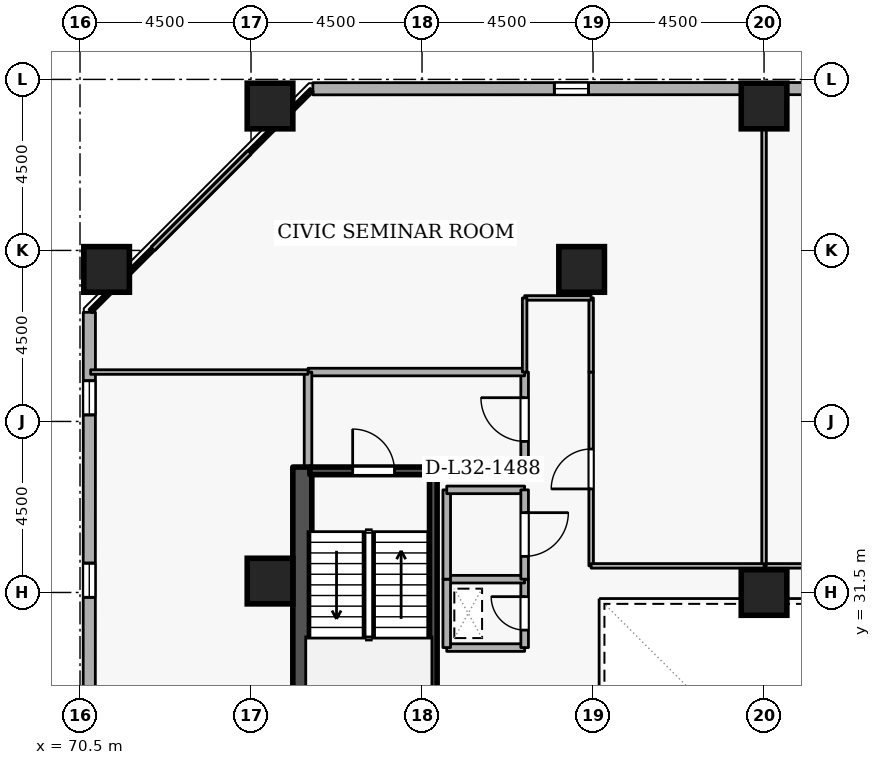
"""IFC4 building model, lengths in metres.
Left out: names, types, materials, properties, quantities, classifications, styles, units other than length and angle.
Written with IfcOpenShell. Run it as: python <this file> out.ifc"""

import sys

from ifc_helpers import new_model, si_unit, direction, frame, frame_2d, origin, origin_2d, place, context, subcontext, project, spatial, rectangle, extrude, element, fill, save


model = new_model("IFC4")
c1 = context("Model", 3, precision=1e-05, world=origin(), true_north=direction((0.0, 1.0)))
c2 = subcontext(c1, "Body", "Model", "MODEL_VIEW")
j1 = project(units=[si_unit("LENGTHUNIT", "METRE"), si_unit("PLANEANGLEUNIT", "RADIAN")], contexts=[c1])
p1 = place(None, origin())
s1 = spatial("IfcSite", under=j1, at=p1, CompositionType="ELEMENT")
p2 = place(p1, origin())
s2 = spatial("IfcBuilding", under=s1, at=p2, CompositionType="ELEMENT")
p3 = place(p2, frame((0.0, 0.0, 123.3)))
s3 = spatial("IfcBuildingStorey", under=s2, at=p3, CompositionType="ELEMENT", Elevation=123.3)
p4 = place(p3, frame((76.35, 19.2, 0.0), z_axis=(0.0, 0.0, 1.0), x_axis=(0.0, 1.0, 0.0)))
e1 = element("IfcWall", 1, at=p4, inside=s3, PredefinedType="SHEAR", context=c2, shape_type="SweptSolid", body=[
    extrude(rectangle(XDim=15.6, YDim=0.5, at=frame_2d((7.8, 0.0))), origin(), (0.0, 0.0, 1.0), 3.6),
])
for number, where, z_axis, x_axis in (
    (2, (88.5, 44.3, 0.0), (0.0, 0.0, 1.0), (1.0, 0.0, 0.0)),
    (3, (75.5, 44.3, 0.0), (0.0, 0.0, 1.0), (1.0, 0.0, 0.0)),
    (4, (71.2, 40.0, 0.0), (0.0, 0.0, 1.0), (1.0, 0.0, 0.0)),
    (5, (83.7, 40.0, 0.0), (0.0, 0.0, 1.0), (1.0, 0.0, 0.0)),
    (6, (75.5, 31.8, 0.0), (0.0, 0.0, 1.0), (1.0, 0.0, 0.0)),
    (7, (88.5, 31.5, 0.0), (0.0, 0.0, 1.0), (1.0, 0.0, 0.0)),
):
    element("IfcColumn", number, at=place(p3, frame(where, z_axis=z_axis, x_axis=x_axis)), inside=s3, PredefinedType="COLUMN", context=c2, shape_type="SweptSolid", body=[
        extrude(rectangle(XDim=1.2, YDim=1.2, at=origin_2d()), origin(), (0.0, 0.0, 1.0), 3.6),
    ])
p5 = place(p3, frame((109.681, 44.765, 0.0), z_axis=(0.0, 0.0, 1.0), x_axis=(-0.999999944762, -0.000332378036, 0.0)))
e8 = element("IfcWall", 8, at=p5, inside=s3, PredefinedType="STANDARD", context=c2, shape_type="SweptSolid", body=[
    extrude(rectangle(XDim=33.054, YDim=0.32, at=frame_2d((16.527, 0.0))), origin(), (0.0, 0.0, 1.0), 2.7),
])
p6 = place(p5, frame((1.8, 0.0, 0.72)))
e9 = element("IfcOpeningElement", 9, at=p6, cuts=e8, PredefinedType="OPENING", context=c2, shape_type="SweptSolid", body=[
    extrude(rectangle(XDim=0.9, YDim=1.75, at=frame_2d((0.45, 0.875))), frame((0.0, 0.17, 0.0), z_axis=(0.0, -1.0, 0.0), x_axis=(1.0, 0.0, 0.0)), (0.0, 0.0, 1.0), 0.34),
])
p7 = place(p5, frame((11.4, 0.0, 0.72)))
e10 = element("IfcOpeningElement", 10, at=p7, cuts=e8, PredefinedType="OPENING", context=c2, shape_type="SweptSolid", body=[
    extrude(rectangle(XDim=0.9, YDim=1.75, at=frame_2d((0.45, 0.875))), frame((0.0, 0.17, 0.0), z_axis=(0.0, -1.0, 0.0), x_axis=(1.0, 0.0, 0.0)), (0.0, 0.0, 1.0), 0.34),
])
p8 = place(p5, frame((16.2, 0.0, 0.72)))
e11 = element("IfcOpeningElement", 11, at=p8, cuts=e8, PredefinedType="OPENING", context=c2, shape_type="SweptSolid", body=[
    extrude(rectangle(XDim=0.9, YDim=1.75, at=frame_2d((0.45, 0.875))), frame((0.0, 0.17, 0.0), z_axis=(0.0, -1.0, 0.0), x_axis=(1.0, 0.0, 0.0)), (0.0, 0.0, 1.0), 0.34),
])
p9 = place(p5, frame((25.8, 0.0, 0.72)))
e12 = element("IfcOpeningElement", 12, at=p9, cuts=e8, PredefinedType="OPENING", context=c2, shape_type="SweptSolid", body=[
    extrude(rectangle(XDim=0.9, YDim=1.75, at=frame_2d((0.45, 0.875))), frame((0.0, 0.17, 0.0), z_axis=(0.0, -1.0, 0.0), x_axis=(1.0, 0.0, 0.0)), (0.0, 0.0, 1.0), 0.34),
])
p10 = place(p3, frame((70.746, 38.872, 0.0), z_axis=(0.0, 0.0, 1.0), x_axis=(-0.000332378036, -0.999999944762, 0.0)))
e13 = element("IfcWall", 13, at=p10, inside=s3, PredefinedType="STANDARD", context=c2, shape_type="SweptSolid", body=[
    extrude(rectangle(XDim=33.054, YDim=0.32, at=frame_2d((16.527, 0.0))), origin(), (0.0, 0.0, 1.0), 2.7),
])
p11 = place(p10, frame((1.8, 0.0, 0.72)))
e14 = element("IfcOpeningElement", 14, at=p11, cuts=e13, PredefinedType="OPENING", context=c2, shape_type="SweptSolid", body=[
    extrude(rectangle(XDim=0.9, YDim=1.75, at=frame_2d((0.45, 0.875))), frame((0.0, 0.17, 0.0), z_axis=(0.0, -1.0, 0.0), x_axis=(1.0, 0.0, 0.0)), (0.0, 0.0, 1.0), 0.34),
])
p12 = place(p10, frame((6.6, 0.0, 0.72)))
e15 = element("IfcOpeningElement", 15, at=p12, cuts=e13, PredefinedType="OPENING", context=c2, shape_type="SweptSolid", body=[
    extrude(rectangle(XDim=0.9, YDim=1.75, at=frame_2d((0.45, 0.875))), frame((0.0, 0.17, 0.0), z_axis=(0.0, -1.0, 0.0), x_axis=(1.0, 0.0, 0.0)), (0.0, 0.0, 1.0), 0.34),
])
p13 = place(p10, frame((16.2, 0.0, 0.72)))
e16 = element("IfcOpeningElement", 16, at=p13, cuts=e13, PredefinedType="OPENING", context=c2, shape_type="SweptSolid", body=[
    extrude(rectangle(XDim=0.9, YDim=1.75, at=frame_2d((0.45, 0.875))), frame((0.0, 0.17, 0.0), z_axis=(0.0, -1.0, 0.0), x_axis=(1.0, 0.0, 0.0)), (0.0, 0.0, 1.0), 0.34),
])
p14 = place(p10, frame((21.0, 0.0, 0.72)))
e17 = element("IfcOpeningElement", 17, at=p14, cuts=e13, PredefinedType="OPENING", context=c2, shape_type="SweptSolid", body=[
    extrude(rectangle(XDim=0.9, YDim=1.75, at=frame_2d((0.45, 0.875))), frame((0.0, 0.17, 0.0), z_axis=(0.0, -1.0, 0.0), x_axis=(1.0, 0.0, 0.0)), (0.0, 0.0, 1.0), 0.34),
])
p15 = place(p3, frame((76.55, 34.7, 0.0), z_axis=(0.0, 0.0, 1.0), x_axis=(1.0, 0.0, 0.0)))
e18 = element("IfcWall", 18, at=p15, inside=s3, PredefinedType="SHEAR", context=c2, shape_type="SweptSolid", body=[
    extrude(rectangle(XDim=3.35, YDim=0.2, at=frame_2d((1.675, 0.0))), origin(), (0.0, 0.0, 1.0), 3.6),
])
p16 = place(p15, frame((1.125, 0.0, 0.0)))
e19 = element("IfcOpeningElement", 19, at=p16, cuts=e18, PredefinedType="OPENING", context=c2, shape_type="SweptSolid", body=[
    extrude(rectangle(XDim=1.1, YDim=2.1, at=frame_2d((0.55, 1.05))), frame((0.0, 0.11, 0.0), z_axis=(0.0, -1.0, 0.0), x_axis=(1.0, 0.0, 0.0)), (0.0, 0.0, 1.0), 0.22),
])
p17 = place(p3, frame((79.797, 27.45, 0.0), z_axis=(0.0, 0.0, 1.0), x_axis=(0.0, 1.0, 0.0)))
e20 = element("IfcWall", 20, at=p17, inside=s3, PredefinedType="SHEAR", context=c2, shape_type="SweptSolid", body=[
    extrude(rectangle(XDim=7.1, YDim=0.2, at=frame_2d((3.55, 0.0))), origin(), (0.0, 0.0, 1.0), 3.6),
])
p18 = place(p3, frame((79.9, 34.8, 0.0), z_axis=(0.0, 0.0, 1.0), x_axis=(1.0, 0.0, 0.0)))
e21 = element("IfcWall", 21, at=p18, inside=s3, PredefinedType="STANDARD", context=c2, shape_type="SweptSolid", body=[
    extrude(rectangle(XDim=2.3, YDim=0.2, at=frame_2d((1.15, 0.0))), origin(), (0.0, 0.0, 1.0), 2.545),
])
p19 = place(p3, frame((82.2, 34.8, 0.0), z_axis=(0.0, 0.0, 1.0), x_axis=(0.0, 1.0, 0.0)))
e22 = element("IfcWall", 22, at=p19, inside=s3, PredefinedType="STANDARD", context=c2, shape_type="SweptSolid", body=[
    extrude(rectangle(XDim=2.5, YDim=0.2, at=frame_2d((1.25, 0.0))), origin(), (0.0, 0.0, 1.0), 3.34),
])
p20 = place(p19, frame((0.675, 0.0, 0.0)))
e23 = element("IfcOpeningElement", 23, at=p20, cuts=e22, PredefinedType="OPENING", context=c2, shape_type="SweptSolid", body=[
    extrude(rectangle(XDim=1.15, YDim=2.1, at=frame_2d((0.575, 1.05))), frame((0.0, 0.11, 0.0), z_axis=(0.0, -1.0, 0.0), x_axis=(1.0, 0.0, 0.0)), (0.0, 0.0, 1.0), 0.22),
])
p21 = place(p3, frame((82.2, 37.3, 0.0), z_axis=(0.0, 0.0, 1.0), x_axis=(-1.0, 0.0, 0.0)))
e24 = element("IfcWall", 24, at=p21, inside=s3, PredefinedType="STANDARD", context=c2, shape_type="SweptSolid", body=[
    extrude(rectangle(XDim=5.7, YDim=0.2, at=frame_2d((2.85, 0.0))), origin(), (0.0, 0.0, 1.0), 3.34),
])
p22 = place(p3, frame((76.5, 37.3, 0.0), z_axis=(0.0, 0.0, 1.0), x_axis=(0.0, -1.0, 0.0)))
e25 = element("IfcWall", 25, at=p22, inside=s3, PredefinedType="STANDARD", context=c2, shape_type="SweptSolid", body=[
    extrude(rectangle(XDim=2.5, YDim=0.2, at=frame_2d((1.25, 0.0))), origin(), (0.0, 0.0, 1.0), 3.34),
])
p23 = place(p3, frame((80.15, 30.05, 0.0), z_axis=(0.0, 0.0, 1.0), x_axis=(1.0, 0.0, 0.0)))
e26 = element("IfcWall", 26, at=p23, inside=s3, PredefinedType="STANDARD", context=c2, shape_type="SweptSolid", body=[
    extrude(rectangle(XDim=2.05, YDim=0.2, at=frame_2d((1.025, 0.0))), origin(), (0.0, 0.0, 1.0), 3.34),
])
p24 = place(p3, frame((82.2, 30.05, 0.0), z_axis=(0.0, 0.0, 1.0), x_axis=(0.0, 1.0, 0.0)))
e27 = element("IfcWall", 27, at=p24, inside=s3, PredefinedType="STANDARD", context=c2, shape_type="SweptSolid", body=[
    extrude(rectangle(XDim=1.8, YDim=0.2, at=frame_2d((0.9, 0.0))), origin(), (0.0, 0.0, 1.0), 3.34),
])
p25 = place(p24, frame((0.46, 0.0, 0.0)))
e28 = element("IfcOpeningElement", 28, at=p25, cuts=e27, PredefinedType="OPENING", context=c2, shape_type="SweptSolid", body=[
    extrude(rectangle(XDim=0.88, YDim=2.04, at=frame_2d((0.44, 1.02))), frame((0.0, 0.11, 0.0), z_axis=(0.0, -1.0, 0.0), x_axis=(1.0, 0.0, 0.0)), (0.0, 0.0, 1.0), 0.22),
])
p26 = place(p3, frame((82.2, 31.85, 0.0), z_axis=(0.0, 0.0, 1.0), x_axis=(-1.0, 0.0, 0.0)))
e29 = element("IfcWall", 29, at=p26, inside=s3, PredefinedType="STANDARD", context=c2, shape_type="SweptSolid", body=[
    extrude(rectangle(XDim=2.05, YDim=0.2, at=frame_2d((1.025, 0.0))), origin(), (0.0, 0.0, 1.0), 3.34),
])
p27 = place(p3, frame((80.15, 31.85, 0.0), z_axis=(0.0, 0.0, 1.0), x_axis=(0.0, -1.0, 0.0)))
e30 = element("IfcWall", 30, at=p27, inside=s3, PredefinedType="STANDARD", context=c2, shape_type="SweptSolid", body=[
    extrude(rectangle(XDim=1.8, YDim=0.2, at=frame_2d((0.9, 0.0))), origin(), (0.0, 0.0, 1.0), 3.34),
])
p28 = place(p3, frame((80.15, 31.85, 0.0), z_axis=(0.0, 0.0, 1.0), x_axis=(0.0, 1.0, 0.0)))
e31 = element("IfcWall", 31, at=p28, inside=s3, PredefinedType="STANDARD", context=c2, shape_type="SweptSolid", body=[
    extrude(rectangle(XDim=2.35, YDim=0.2, at=frame_2d((1.175, 0.0))), origin(), (0.0, 0.0, 1.0), 3.34),
])
p29 = place(p3, frame((80.15, 34.2, 0.0), z_axis=(0.0, 0.0, 1.0), x_axis=(1.0, 0.0, 0.0)))
e32 = element("IfcWall", 32, at=p29, inside=s3, PredefinedType="STANDARD", context=c2, shape_type="SweptSolid", body=[
    extrude(rectangle(XDim=2.05, YDim=0.2, at=frame_2d((1.025, 0.0))), origin(), (0.0, 0.0, 1.0), 2.545),
])
p30 = place(p3, frame((82.2, 34.2, 0.0), z_axis=(0.0, 0.0, 1.0), x_axis=(0.0, -1.0, 0.0)))
e33 = element("IfcWall", 33, at=p30, inside=s3, PredefinedType="STANDARD", context=c2, shape_type="SweptSolid", body=[
    extrude(rectangle(XDim=2.35, YDim=0.2, at=frame_2d((1.175, 0.0))), origin(), (0.0, 0.0, 1.0), 3.34),
])
p31 = place(p30, frame((0.6, 0.0, 0.0)))
e34 = element("IfcOpeningElement", 34, at=p31, cuts=e33, PredefinedType="OPENING", context=c2, shape_type="SweptSolid", body=[
    extrude(rectangle(XDim=1.15, YDim=2.1, at=frame_2d((0.575, 1.05))), frame((0.0, 0.11, 0.0), z_axis=(0.0, -1.0, 0.0), x_axis=(1.0, 0.0, 0.0)), (0.0, 0.0, 1.0), 0.22),
])
p32 = place(p3, frame((93.05, 32.2, 0.0), z_axis=(0.0, 0.0, 1.0), x_axis=(-1.0, 0.0, 0.0)))
e35 = element("IfcWall", 35, at=p32, inside=s3, PredefinedType="PARTITIONING", context=c2, shape_type="SweptSolid", body=[
    extrude(rectangle(XDim=4.55, YDim=0.12, at=frame_2d((2.275, 0.0))), origin(), (0.0, 0.0, 1.0), 3.34),
])
p33 = place(p3, frame((88.5, 32.2, 0.0), z_axis=(0.0, 0.0, 1.0), x_axis=(0.0, 1.0, 0.0)))
e36 = element("IfcWall", 36, at=p33, inside=s3, PredefinedType="PARTITIONING", context=c2, shape_type="SweptSolid", body=[
    extrude(rectangle(XDim=12.52, YDim=0.12, at=frame_2d((6.26, 0.0))), origin(), (0.0, 0.0, 1.0), 2.932),
])
p34 = place(p3, frame((83.95, 32.2, 0.0), z_axis=(0.0, 0.0, 1.0), x_axis=(0.0, 1.0, 0.0)))
e37 = element("IfcWall", 37, at=p34, inside=s3, PredefinedType="PARTITIONING", context=c2, shape_type="SweptSolid", body=[
    extrude(rectangle(XDim=5.1, YDim=0.12, at=frame_2d((2.55, 0.0))), origin(), (0.0, 0.0, 1.0), 3.34),
])
p35 = place(p34, frame((2.025, 0.0, 0.0)))
e38 = element("IfcOpeningElement", 38, at=p35, cuts=e37, PredefinedType="OPENING", context=c2, shape_type="SweptSolid", body=[
    extrude(rectangle(XDim=1.05, YDim=2.1, at=frame_2d((0.525, 1.05))), frame((0.0, 0.07, 0.0), z_axis=(0.0, -1.0, 0.0), x_axis=(1.0, 0.0, 0.0)), (0.0, 0.0, 1.0), 0.14),
])
p36 = place(p3, frame((83.95, 37.3, 0.0), z_axis=(0.0, 0.0, 1.0), x_axis=(0.0, 1.0, 0.0)))
e39 = element("IfcWall", 39, at=p36, inside=s3, PredefinedType="PARTITIONING", context=c2, shape_type="SweptSolid", body=[
    extrude(rectangle(XDim=1.95, YDim=0.12, at=frame_2d((0.975, 0.0))), origin(), (0.0, 0.0, 1.0), 3.34),
])
p37 = place(p3, frame((83.95, 39.25, 0.0), z_axis=(0.0, 0.0, 1.0), x_axis=(-1.0, 0.0, 0.0)))
e40 = element("IfcWall", 40, at=p37, inside=s3, PredefinedType="PARTITIONING", context=c2, shape_type="SweptSolid", body=[
    extrude(rectangle(XDim=1.75, YDim=0.12, at=frame_2d((0.875, 0.0))), origin(), (0.0, 0.0, 1.0), 3.34),
])
p38 = place(p3, frame((82.2, 39.25, 0.0), z_axis=(0.0, 0.0, 1.0), x_axis=(0.0, -1.0, 0.0)))
e41 = element("IfcWall", 41, at=p38, inside=s3, PredefinedType="PARTITIONING", context=c2, shape_type="SweptSolid", body=[
    extrude(rectangle(XDim=1.95, YDim=0.12, at=frame_2d((0.975, 0.0))), origin(), (0.0, 0.0, 1.0), 3.34),
])
p39 = place(p3, frame((76.5, 37.3, 0.0), z_axis=(0.0, 0.0, 1.0), x_axis=(-1.0, 0.0, 0.0)))
e42 = element("IfcWall", 42, at=p39, inside=s3, PredefinedType="PARTITIONING", context=c2, shape_type="SweptSolid", body=[
    extrude(rectangle(XDim=5.72, YDim=0.12, at=frame_2d((2.86, 0.0))), origin(), (0.0, 0.0, 1.0), 3.34),
])
p40 = place(p3, frame((70.78, 38.902, 0.0), z_axis=(0.0, 0.0, 1.0), x_axis=(0.707106781187, 0.707106781187, 0.0)))
e43 = element("IfcWall", 43, at=p40, inside=s3, PredefinedType="PARTITIONING", context=c2, shape_type="SweptSolid", body=[
    extrude(rectangle(XDim=8.227, YDim=0.12, at=frame_2d((4.114, 0.0))), origin(), (0.0, 0.0, 1.0), 3.34),
])
p41 = place(p3, frame((88.5, 32.2, 0.0), z_axis=(0.0, 0.0, 1.0), x_axis=(-1.0, 0.0, 0.0)))
e44 = element("IfcWall", 44, at=p41, inside=s3, PredefinedType="PARTITIONING", context=c2, shape_type="SweptSolid", body=[
    extrude(rectangle(XDim=4.55, YDim=0.12, at=frame_2d((2.275, 0.0))), origin(), (0.0, 0.0, 1.0), 3.34),
])
p42 = place(p9, origin())
e45 = element("IfcWindow", 45, at=p42, inside=s3, PartitioningType="SINGLE_PANEL", PredefinedType="WINDOW", context=c2, shape_type="SweptSolid", body=[
    extrude(rectangle(XDim=0.9, YDim=1.75, at=frame_2d((0.45, 0.875))), frame((0.0, 0.03, 0.0), z_axis=(0.0, -1.0, 0.0), x_axis=(1.0, 0.0, 0.0)), (0.0, 0.0, 1.0), 0.06),
])
fill(e12, e45)
p43 = place(p11, origin())
e46 = element("IfcWindow", 46, at=p43, inside=s3, PartitioningType="SINGLE_PANEL", PredefinedType="WINDOW", context=c2, shape_type="SweptSolid", body=[
    extrude(rectangle(XDim=0.9, YDim=1.75, at=frame_2d((0.45, 0.875))), frame((0.0, 0.03, 0.0), z_axis=(0.0, -1.0, 0.0), x_axis=(1.0, 0.0, 0.0)), (0.0, 0.0, 1.0), 0.06),
])
fill(e14, e46)
p44 = place(p12, origin())
e47 = element("IfcWindow", 47, at=p44, inside=s3, PartitioningType="SINGLE_PANEL", PredefinedType="WINDOW", context=c2, shape_type="SweptSolid", body=[
    extrude(rectangle(XDim=0.9, YDim=1.75, at=frame_2d((0.45, 0.875))), frame((0.0, 0.03, 0.0), z_axis=(0.0, -1.0, 0.0), x_axis=(1.0, 0.0, 0.0)), (0.0, 0.0, 1.0), 0.06),
])
fill(e15, e47)
p45 = place(p16, origin())
e48 = element("IfcDoor", 48, at=p45, inside=s3, OperationType="SINGLE_SWING_LEFT", PredefinedType="DOOR", context=c2, shape_type="SweptSolid", body=[
    extrude(rectangle(XDim=1.1, YDim=2.1, at=frame_2d((0.55, 1.05))), frame((0.0, 0.025, 0.0), z_axis=(0.0, -1.0, 0.0), x_axis=(1.0, 0.0, 0.0)), (0.0, 0.0, 1.0), 0.05),
])
fill(e19, e48)
p46 = place(p20, origin())
e49 = element("IfcDoor", 49, at=p46, inside=s3, OperationType="SINGLE_SWING_RIGHT", PredefinedType="DOOR", context=c2, shape_type="SweptSolid", body=[
    extrude(rectangle(XDim=1.15, YDim=2.1, at=frame_2d((0.575, 1.05))), frame((0.0, 0.025, 0.0), z_axis=(0.0, -1.0, 0.0), x_axis=(1.0, 0.0, 0.0)), (0.0, 0.0, 1.0), 0.05),
])
fill(e23, e49)
p47 = place(p25, origin())
e50 = element("IfcDoor", 50, at=p47, inside=s3, OperationType="SINGLE_SWING_RIGHT", PredefinedType="DOOR", context=c2, shape_type="SweptSolid", body=[
    extrude(rectangle(XDim=0.88, YDim=2.04, at=frame_2d((0.44, 1.02))), frame((0.0, 0.025, 0.0), z_axis=(0.0, -1.0, 0.0), x_axis=(1.0, 0.0, 0.0)), (0.0, 0.0, 1.0), 0.05),
])
fill(e28, e50)
p48 = place(p31, origin())
e51 = element("IfcDoor", 51, at=p48, inside=s3, OperationType="SINGLE_SWING_LEFT", PredefinedType="DOOR", context=c2, shape_type="SweptSolid", body=[
    extrude(rectangle(XDim=1.15, YDim=2.1, at=frame_2d((0.575, 1.05))), frame((0.0, 0.025, 0.0), z_axis=(0.0, -1.0, 0.0), x_axis=(1.0, 0.0, 0.0)), (0.0, 0.0, 1.0), 0.05),
])
fill(e34, e51)
p49 = place(p35, origin())
e52 = element("IfcDoor", 52, at=p49, inside=s3, OperationType="SINGLE_SWING_LEFT", PredefinedType="DOOR", context=c2, shape_type="SweptSolid", body=[
    extrude(rectangle(XDim=1.05, YDim=2.1, at=frame_2d((0.525, 1.05))), frame((0.0, 0.025, 0.0), z_axis=(0.0, -1.0, 0.0), x_axis=(1.0, 0.0, 0.0)), (0.0, 0.0, 1.0), 0.05),
])
fill(e38, e52)
save(model, sys.argv[1])
